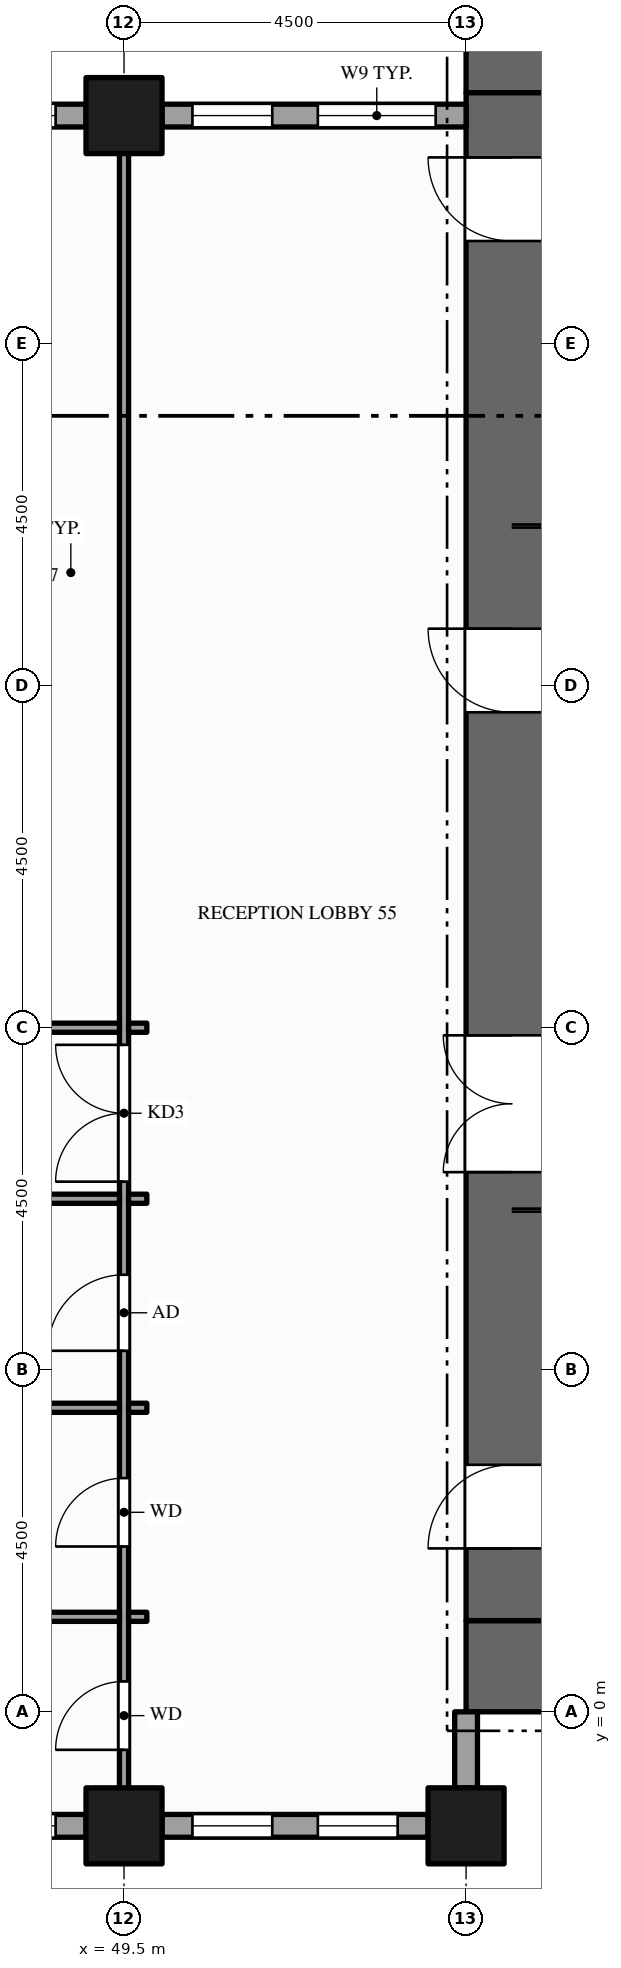
"""IFC4 building model, lengths in metres.
Left out: names, types, materials, properties, quantities, classifications, styles, units other than length and angle.
Written with IfcOpenShell. Run it as: python <this file> out.ifc"""

import sys

from ifc_helpers import new_model, si_unit, direction, frame, frame_2d, origin, origin_2d, place, context, subcontext, project, spatial, rectangle, hollow_rectangle, extrude, element, fill, save


model = new_model("IFC4")
c1 = context("Model", 3, precision=1e-05, world=origin(), true_north=direction((0.0, 1.0)))
c2 = subcontext(c1, "Body", "Model", "MODEL_VIEW")
j1 = project(units=[si_unit("LENGTHUNIT", "METRE"), si_unit("PLANEANGLEUNIT", "RADIAN")], contexts=[c1])
p1 = place(None, origin())
s1 = spatial("IfcSite", under=j1, at=p1, CompositionType="ELEMENT")
p2 = place(p1, origin())
s2 = spatial("IfcBuilding", under=s1, at=p2, CompositionType="ELEMENT")
p3 = place(p2, frame((0.0, 0.0, 103.0)))
s3 = spatial("IfcBuildingStorey", under=s2, at=p3, CompositionType="ELEMENT", Elevation=103.0)
for number, where, z_axis, x_axis in (
    (1, (67.5, 0.6, -0.15), (0.0, 0.0, 1.0), (-1.0, 0.0, 0.0)),
    (2, (54.0, 21.9, -0.15), (0.0, 0.0, 1.0), (1.0, 0.0, 0.0)),
):
    element("IfcWall", number, at=place(p3, frame(where, z_axis=z_axis, x_axis=x_axis)), inside=s3, PredefinedType="SHEAR", context=c2, shape_type="SweptSolid", body=[
        extrude(rectangle(XDim=13.5, YDim=1.2, at=frame_2d((6.75, 0.0))), origin(), (0.0, 0.0, 1.0), 4.0),
    ])
p4 = place(p3, frame((54.6, 1.2, -0.15), z_axis=(0.0, 0.0, 1.0), x_axis=(0.0, 1.0, 0.0)))
e3 = element("IfcWall", 3, at=p4, inside=s3, PredefinedType="SHEAR", context=c2, shape_type="SweptSolid", body=[
    extrude(rectangle(XDim=20.1, YDim=1.2, at=frame_2d((10.05, 0.0))), origin(), (0.0, 0.0, 1.0), 4.0),
])
p5 = place(p4, frame((5.9, 0.0, 0.15)))
e4 = element("IfcOpeningElement", 4, at=p5, cuts=e3, PredefinedType="OPENING", context=c2, shape_type="SweptSolid", body=[
    extrude(rectangle(XDim=1.8, YDim=2.1, at=frame_2d((0.9, 1.05))), frame((0.0, 0.61, 0.0), z_axis=(0.0, -1.0, 0.0), x_axis=(1.0, 0.0, 0.0)), (0.0, 0.0, 1.0), 1.22),
])
p6 = place(p4, frame((11.95, 0.0, 0.15)))
e5 = element("IfcOpeningElement", 5, at=p6, cuts=e3, PredefinedType="OPENING", context=c2, shape_type="SweptSolid", body=[
    extrude(rectangle(XDim=1.1, YDim=2.1, at=frame_2d((0.55, 1.05))), frame((0.0, 0.61, 0.0), z_axis=(0.0, -1.0, 0.0), x_axis=(1.0, 0.0, 0.0)), (0.0, 0.0, 1.0), 1.22),
])
p7 = place(p4, frame((0.95, 0.0, 0.15)))
e6 = element("IfcOpeningElement", 6, at=p7, cuts=e3, PredefinedType="OPENING", context=c2, shape_type="SweptSolid", body=[
    extrude(rectangle(XDim=1.1, YDim=2.1, at=frame_2d((0.55, 1.05))), frame((0.0, 0.61, 0.0), z_axis=(0.0, -1.0, 0.0), x_axis=(1.0, 0.0, 0.0)), (0.0, 0.0, 1.0), 1.22),
])
p8 = place(p4, frame((18.15, 0.0, 0.15)))
e7 = element("IfcOpeningElement", 7, at=p8, cuts=e3, PredefinedType="OPENING", context=c2, shape_type="SweptSolid", body=[
    extrude(rectangle(XDim=1.1, YDim=2.1, at=frame_2d((0.55, 1.05))), frame((0.0, 0.61, 0.0), z_axis=(0.0, -1.0, 0.0), x_axis=(1.0, 0.0, 0.0)), (0.0, 0.0, 1.0), 1.22),
])
for number, where, z_axis, x_axis in (
    (8, (49.5, -1.5, -0.15), (0.0, 0.0, 1.0), (1.0, 0.0, 0.0)),
    (9, (49.5, 21.0, -0.15), (0.0, 0.0, 1.0), (1.0, 0.0, 0.0)),
    (10, (54.0, -1.5, -0.15), (0.0, 0.0, 1.0), (1.0, 0.0, 0.0)),
):
    element("IfcColumn", number, at=place(p3, frame(where, z_axis=z_axis, x_axis=x_axis)), inside=s3, PredefinedType="COLUMN", context=c2, shape_type="SweptSolid", body=[
        extrude(hollow_rectangle(XDim=1.0, YDim=1.0, WallThickness=0.05, at=origin_2d()), origin(), (0.0, 0.0, 1.0), 4.0),
    ])
p9 = place(p3, frame((45.5, -1.5, 0.0), z_axis=(0.0, 0.0, 1.0), x_axis=(1.0, 0.0, 0.0)))
e11 = element("IfcWall", 11, at=p9, inside=s3, PredefinedType="STANDARD", context=c2, shape_type="SweptSolid", body=[
    extrude(rectangle(XDim=3.5, YDim=0.3, at=frame_2d((1.75, 0.0))), origin(), (0.0, 0.0, 1.0), 3.154),
])
p10 = place(p9, frame((0.4, 0.0, 0.9)))
e12 = element("IfcOpeningElement", 12, at=p10, cuts=e11, PredefinedType="OPENING", context=c2, shape_type="SweptSolid", body=[
    extrude(rectangle(XDim=1.05, YDim=2.0, at=frame_2d((0.525, 1.0))), frame((0.0, 0.16, 0.0), z_axis=(0.0, -1.0, 0.0), x_axis=(1.0, 0.0, 0.0)), (0.0, 0.0, 1.0), 0.32),
])
p11 = place(p9, frame((2.05, 0.0, 0.9)))
e13 = element("IfcOpeningElement", 13, at=p11, cuts=e11, PredefinedType="OPENING", context=c2, shape_type="SweptSolid", body=[
    extrude(rectangle(XDim=1.05, YDim=2.0, at=frame_2d((0.525, 1.0))), frame((0.0, 0.16, 0.0), z_axis=(0.0, -1.0, 0.0), x_axis=(1.0, 0.0, 0.0)), (0.0, 0.0, 1.0), 0.32),
])
p12 = place(p3, frame((50.0, -1.5, 0.0), z_axis=(0.0, 0.0, 1.0), x_axis=(1.0, 0.0, 0.0)))
e14 = element("IfcWall", 14, at=p12, inside=s3, PredefinedType="STANDARD", context=c2, shape_type="SweptSolid", body=[
    extrude(rectangle(XDim=3.5, YDim=0.3, at=frame_2d((1.75, 0.0))), origin(), (0.0, 0.0, 1.0), 3.154),
])
p13 = place(p12, frame((0.4, 0.0, 0.9)))
e15 = element("IfcOpeningElement", 15, at=p13, cuts=e14, PredefinedType="OPENING", context=c2, shape_type="SweptSolid", body=[
    extrude(rectangle(XDim=1.05, YDim=2.0, at=frame_2d((0.525, 1.0))), frame((0.0, 0.16, 0.0), z_axis=(0.0, -1.0, 0.0), x_axis=(1.0, 0.0, 0.0)), (0.0, 0.0, 1.0), 0.32),
])
p14 = place(p12, frame((2.05, 0.0, 0.9)))
e16 = element("IfcOpeningElement", 16, at=p14, cuts=e14, PredefinedType="OPENING", context=c2, shape_type="SweptSolid", body=[
    extrude(rectangle(XDim=1.05, YDim=2.0, at=frame_2d((0.525, 1.0))), frame((0.0, 0.16, 0.0), z_axis=(0.0, -1.0, 0.0), x_axis=(1.0, 0.0, 0.0)), (0.0, 0.0, 1.0), 0.32),
])
p15 = place(p3, frame((54.0, -1.0, 0.0), z_axis=(0.0, 0.0, 1.0), x_axis=(0.0, 1.0, 0.0)))
e17 = element("IfcWall", 17, at=p15, inside=s3, PredefinedType="STANDARD", context=c2, shape_type="SweptSolid", body=[
    extrude(rectangle(XDim=1.0, YDim=0.3, at=frame_2d((0.5, 0.0))), origin(), (0.0, 0.0, 1.0), 3.154),
])
p16 = place(p3, frame((54.0, 21.0, 0.0), z_axis=(0.0, 0.0, 1.0), x_axis=(-1.0, 0.0, 0.0)))
e18 = element("IfcWall", 18, at=p16, inside=s3, PredefinedType="STANDARD", context=c2, shape_type="SweptSolid", body=[
    extrude(rectangle(XDim=4.0, YDim=0.3, at=frame_2d((2.0, 0.0))), origin(), (0.0, 0.0, 1.0), 3.154),
])
p17 = place(p16, frame((0.4, 0.0, 0.9)))
e19 = element("IfcOpeningElement", 19, at=p17, cuts=e18, PredefinedType="OPENING", context=c2, shape_type="SweptSolid", body=[
    extrude(rectangle(XDim=1.55, YDim=2.0, at=frame_2d((0.775, 1.0))), frame((0.0, 0.16, 0.0), z_axis=(0.0, -1.0, 0.0), x_axis=(1.0, 0.0, 0.0)), (0.0, 0.0, 1.0), 0.32),
])
p18 = place(p16, frame((2.55, 0.0, 0.9)))
e20 = element("IfcOpeningElement", 20, at=p18, cuts=e18, PredefinedType="OPENING", context=c2, shape_type="SweptSolid", body=[
    extrude(rectangle(XDim=1.05, YDim=2.0, at=frame_2d((0.525, 1.0))), frame((0.0, 0.16, 0.0), z_axis=(0.0, -1.0, 0.0), x_axis=(1.0, 0.0, 0.0)), (0.0, 0.0, 1.0), 0.32),
])
p19 = place(p3, frame((49.0, 21.0, 0.0), z_axis=(0.0, 0.0, 1.0), x_axis=(-1.0, 0.0, 0.0)))
e21 = element("IfcWall", 21, at=p19, inside=s3, PredefinedType="STANDARD", context=c2, shape_type="SweptSolid", body=[
    extrude(rectangle(XDim=3.5, YDim=0.3, at=frame_2d((1.75, 0.0))), origin(), (0.0, 0.0, 1.0), 3.154),
])
p20 = place(p19, frame((0.4, 0.0, 0.9)))
e22 = element("IfcOpeningElement", 22, at=p20, cuts=e21, PredefinedType="OPENING", context=c2, shape_type="SweptSolid", body=[
    extrude(rectangle(XDim=1.05, YDim=2.0, at=frame_2d((0.525, 1.0))), frame((0.0, 0.16, 0.0), z_axis=(0.0, -1.0, 0.0), x_axis=(1.0, 0.0, 0.0)), (0.0, 0.0, 1.0), 0.32),
])
p21 = place(p19, frame((2.05, 0.0, 0.9)))
e23 = element("IfcOpeningElement", 23, at=p21, cuts=e21, PredefinedType="OPENING", context=c2, shape_type="SweptSolid", body=[
    extrude(rectangle(XDim=1.05, YDim=2.0, at=frame_2d((0.525, 1.0))), frame((0.0, 0.16, 0.0), z_axis=(0.0, -1.0, 0.0), x_axis=(1.0, 0.0, 0.0)), (0.0, 0.0, 1.0), 0.32),
])
p22 = place(p3, frame((49.5, -1.35, 0.0), z_axis=(0.0, 0.0, 1.0), x_axis=(0.0, 1.0, 0.0)))
e24 = element("IfcWall", 24, at=p22, inside=s3, PredefinedType="PARTITIONING", context=c2, shape_type="SweptSolid", body=[
    extrude(rectangle(XDim=22.2, YDim=0.12, at=frame_2d((11.1, 0.0))), origin(), (0.0, 0.0, 1.0), 2.938),
])
p23 = place(p22, frame((8.325, 0.0, 0.0)))
e25 = element("IfcOpeningElement", 25, at=p23, cuts=e24, PredefinedType="OPENING", context=c2, shape_type="SweptSolid", body=[
    extrude(rectangle(XDim=1.8, YDim=2.1, at=frame_2d((0.9, 1.05))), frame((0.0, 0.07, 0.0), z_axis=(0.0, -1.0, 0.0), x_axis=(1.0, 0.0, 0.0)), (0.0, 0.0, 1.0), 0.14),
])
p24 = place(p22, frame((0.85, 0.0, 0.0)))
e26 = element("IfcOpeningElement", 26, at=p24, cuts=e24, PredefinedType="OPENING", context=c2, shape_type="SweptSolid", body=[
    extrude(rectangle(XDim=0.9, YDim=2.1, at=frame_2d((0.45, 1.05))), frame((0.0, 0.07, 0.0), z_axis=(0.0, -1.0, 0.0), x_axis=(1.0, 0.0, 0.0)), (0.0, 0.0, 1.0), 0.14),
])
p25 = place(p22, frame((3.525, 0.0, 0.0)))
e27 = element("IfcOpeningElement", 27, at=p25, cuts=e24, PredefinedType="OPENING", context=c2, shape_type="SweptSolid", body=[
    extrude(rectangle(XDim=0.9, YDim=2.1, at=frame_2d((0.45, 1.05))), frame((0.0, 0.07, 0.0), z_axis=(0.0, -1.0, 0.0), x_axis=(1.0, 0.0, 0.0)), (0.0, 0.0, 1.0), 0.14),
])
p26 = place(p22, frame((6.1, 0.0, 0.0)))
e28 = element("IfcOpeningElement", 28, at=p26, cuts=e24, PredefinedType="OPENING", context=c2, shape_type="SweptSolid", body=[
    extrude(rectangle(XDim=1.0, YDim=2.1, at=frame_2d((0.5, 1.05))), frame((0.0, 0.07, 0.0), z_axis=(0.0, -1.0, 0.0), x_axis=(1.0, 0.0, 0.0)), (0.0, 0.0, 1.0), 0.14),
])
p27 = place(p3, frame((45.06, 1.25, 0.0), z_axis=(0.0, 0.0, 1.0), x_axis=(1.0, 0.0, 0.0)))
e29 = element("IfcWall", 29, at=p27, inside=s3, PredefinedType="PARTITIONING", context=c2, shape_type="SweptSolid", body=[
    extrude(rectangle(XDim=4.38, YDim=0.12, at=frame_2d((2.19, 0.0))), origin(), (0.0, 0.0, 1.0), 2.938),
])
p28 = place(p3, frame((49.56, 1.25, 0.0), z_axis=(0.0, 0.0, 1.0), x_axis=(1.0, 0.0, 0.0)))
e30 = element("IfcWall", 30, at=p28, inside=s3, PredefinedType="PARTITIONING", context=c2, shape_type="SweptSolid", body=[
    extrude(rectangle(XDim=0.24, YDim=0.12, at=frame_2d((0.12, 0.0))), origin(), (0.0, 0.0, 1.0), 2.938),
])
p29 = place(p3, frame((45.06, 4.0, 0.0), z_axis=(0.0, 0.0, 1.0), x_axis=(1.0, 0.0, 0.0)))
e31 = element("IfcWall", 31, at=p29, inside=s3, PredefinedType="PARTITIONING", context=c2, shape_type="SweptSolid", body=[
    extrude(rectangle(XDim=4.38, YDim=0.12, at=frame_2d((2.19, 0.0))), origin(), (0.0, 0.0, 1.0), 2.938),
])
p30 = place(p3, frame((49.56, 4.0, 0.0), z_axis=(0.0, 0.0, 1.0), x_axis=(1.0, 0.0, 0.0)))
e32 = element("IfcWall", 32, at=p30, inside=s3, PredefinedType="PARTITIONING", context=c2, shape_type="SweptSolid", body=[
    extrude(rectangle(XDim=0.24, YDim=0.12, at=frame_2d((0.12, 0.0))), origin(), (0.0, 0.0, 1.0), 2.938),
])
p31 = place(p3, frame((45.06, 6.75, 0.0), z_axis=(0.0, 0.0, 1.0), x_axis=(1.0, 0.0, 0.0)))
e33 = element("IfcWall", 33, at=p31, inside=s3, PredefinedType="PARTITIONING", context=c2, shape_type="SweptSolid", body=[
    extrude(rectangle(XDim=4.38, YDim=0.12, at=frame_2d((2.19, 0.0))), origin(), (0.0, 0.0, 1.0), 2.938),
])
p32 = place(p3, frame((49.56, 6.75, 0.0), z_axis=(0.0, 0.0, 1.0), x_axis=(1.0, 0.0, 0.0)))
e34 = element("IfcWall", 34, at=p32, inside=s3, PredefinedType="PARTITIONING", context=c2, shape_type="SweptSolid", body=[
    extrude(rectangle(XDim=0.24, YDim=0.12, at=frame_2d((0.12, 0.0))), origin(), (0.0, 0.0, 1.0), 2.938),
])
p33 = place(p3, frame((45.06, 9.0, 0.0), z_axis=(0.0, 0.0, 1.0), x_axis=(1.0, 0.0, 0.0)))
e35 = element("IfcWall", 35, at=p33, inside=s3, PredefinedType="PARTITIONING", context=c2, shape_type="SweptSolid", body=[
    extrude(rectangle(XDim=4.38, YDim=0.12, at=frame_2d((2.19, 0.0))), origin(), (0.0, 0.0, 1.0), 2.938),
])
p34 = place(p33, frame((1.59, 0.0, 0.0)))
e36 = element("IfcOpeningElement", 36, at=p34, cuts=e35, PredefinedType="OPENING", context=c2, shape_type="SweptSolid", body=[
    extrude(rectangle(XDim=1.2, YDim=2.1, at=frame_2d((0.6, 1.05))), frame((0.0, 0.07, 0.0), z_axis=(0.0, -1.0, 0.0), x_axis=(1.0, 0.0, 0.0)), (0.0, 0.0, 1.0), 0.14),
])
p35 = place(p3, frame((49.56, 9.0, 0.0), z_axis=(0.0, 0.0, 1.0), x_axis=(1.0, 0.0, 0.0)))
e37 = element("IfcWall", 37, at=p35, inside=s3, PredefinedType="PARTITIONING", context=c2, shape_type="SweptSolid", body=[
    extrude(rectangle(XDim=0.24, YDim=0.12, at=frame_2d((0.12, 0.0))), origin(), (0.0, 0.0, 1.0), 2.938),
])
p36 = place(p11, origin())
e38 = element("IfcWindow", 38, at=p36, inside=s3, PartitioningType="SINGLE_PANEL", PredefinedType="WINDOW", context=c2, shape_type="SweptSolid", body=[
    extrude(rectangle(XDim=1.05, YDim=2.0, at=frame_2d((0.525, 1.0))), frame((0.0, 0.03, 0.0), z_axis=(0.0, -1.0, 0.0), x_axis=(1.0, 0.0, 0.0)), (0.0, 0.0, 1.0), 0.06),
])
fill(e13, e38)
p37 = place(p13, origin())
e39 = element("IfcWindow", 39, at=p37, inside=s3, PartitioningType="SINGLE_PANEL", PredefinedType="WINDOW", context=c2, shape_type="SweptSolid", body=[
    extrude(rectangle(XDim=1.05, YDim=2.0, at=frame_2d((0.525, 1.0))), frame((0.0, 0.03, 0.0), z_axis=(0.0, -1.0, 0.0), x_axis=(1.0, 0.0, 0.0)), (0.0, 0.0, 1.0), 0.06),
])
fill(e15, e39)
p38 = place(p14, origin())
e40 = element("IfcWindow", 40, at=p38, inside=s3, PartitioningType="SINGLE_PANEL", PredefinedType="WINDOW", context=c2, shape_type="SweptSolid", body=[
    extrude(rectangle(XDim=1.05, YDim=2.0, at=frame_2d((0.525, 1.0))), frame((0.0, 0.03, 0.0), z_axis=(0.0, -1.0, 0.0), x_axis=(1.0, 0.0, 0.0)), (0.0, 0.0, 1.0), 0.06),
])
fill(e16, e40)
p39 = place(p17, origin())
e41 = element("IfcWindow", 41, at=p39, inside=s3, PartitioningType="SINGLE_PANEL", PredefinedType="WINDOW", context=c2, shape_type="SweptSolid", body=[
    extrude(rectangle(XDim=1.55, YDim=2.0, at=frame_2d((0.775, 1.0))), frame((0.0, 0.03, 0.0), z_axis=(0.0, -1.0, 0.0), x_axis=(1.0, 0.0, 0.0)), (0.0, 0.0, 1.0), 0.06),
])
fill(e19, e41)
p40 = place(p18, origin())
e42 = element("IfcWindow", 42, at=p40, inside=s3, PartitioningType="SINGLE_PANEL", PredefinedType="WINDOW", context=c2, shape_type="SweptSolid", body=[
    extrude(rectangle(XDim=1.05, YDim=2.0, at=frame_2d((0.525, 1.0))), frame((0.0, 0.03, 0.0), z_axis=(0.0, -1.0, 0.0), x_axis=(1.0, 0.0, 0.0)), (0.0, 0.0, 1.0), 0.06),
])
fill(e20, e42)
p41 = place(p20, origin())
e43 = element("IfcWindow", 43, at=p41, inside=s3, PartitioningType="SINGLE_PANEL", PredefinedType="WINDOW", context=c2, shape_type="SweptSolid", body=[
    extrude(rectangle(XDim=1.05, YDim=2.0, at=frame_2d((0.525, 1.0))), frame((0.0, 0.03, 0.0), z_axis=(0.0, -1.0, 0.0), x_axis=(1.0, 0.0, 0.0)), (0.0, 0.0, 1.0), 0.06),
])
fill(e22, e43)
p42 = place(p5, origin())
e44 = element("IfcDoor", 44, at=p42, inside=s3, OperationType="DOUBLE_DOOR_SINGLE_SWING", PredefinedType="DOOR", context=c2, shape_type="SweptSolid", body=[
    extrude(rectangle(XDim=1.8, YDim=2.1, at=frame_2d((0.9, 1.05))), frame((0.0, 0.025, 0.0), z_axis=(0.0, -1.0, 0.0), x_axis=(1.0, 0.0, 0.0)), (0.0, 0.0, 1.0), 0.05),
])
fill(e4, e44)
p43 = place(p6, origin())
e45 = element("IfcDoor", 45, at=p43, inside=s3, OperationType="SINGLE_SWING_RIGHT", PredefinedType="DOOR", context=c2, shape_type="SweptSolid", body=[
    extrude(rectangle(XDim=1.1, YDim=2.1, at=frame_2d((0.55, 1.05))), frame((0.0, 0.025, 0.0), z_axis=(0.0, -1.0, 0.0), x_axis=(1.0, 0.0, 0.0)), (0.0, 0.0, 1.0), 0.05),
])
fill(e5, e45)
p44 = place(p7, origin())
e46 = element("IfcDoor", 46, at=p44, inside=s3, OperationType="SINGLE_SWING_LEFT", PredefinedType="DOOR", context=c2, shape_type="SweptSolid", body=[
    extrude(rectangle(XDim=1.1, YDim=2.1, at=frame_2d((0.55, 1.05))), frame((0.0, 0.025, 0.0), z_axis=(0.0, -1.0, 0.0), x_axis=(1.0, 0.0, 0.0)), (0.0, 0.0, 1.0), 0.05),
])
fill(e6, e46)
p45 = place(p8, origin())
e47 = element("IfcDoor", 47, at=p45, inside=s3, OperationType="SINGLE_SWING_RIGHT", PredefinedType="DOOR", context=c2, shape_type="SweptSolid", body=[
    extrude(rectangle(XDim=1.1, YDim=2.1, at=frame_2d((0.55, 1.05))), frame((0.0, 0.025, 0.0), z_axis=(0.0, -1.0, 0.0), x_axis=(1.0, 0.0, 0.0)), (0.0, 0.0, 1.0), 0.05),
])
fill(e7, e47)
p46 = place(p23, origin())
e48 = element("IfcDoor", 48, at=p46, inside=s3, OperationType="DOUBLE_DOOR_SINGLE_SWING", PredefinedType="DOOR", context=c2, shape_type="SweptSolid", body=[
    extrude(rectangle(XDim=1.8, YDim=2.1, at=frame_2d((0.9, 1.05))), frame((0.0, 0.025, 0.0), z_axis=(0.0, -1.0, 0.0), x_axis=(1.0, 0.0, 0.0)), (0.0, 0.0, 1.0), 0.05),
])
fill(e25, e48)
p47 = place(p24, origin())
e49 = element("IfcDoor", 49, at=p47, inside=s3, OperationType="SINGLE_SWING_LEFT", PredefinedType="DOOR", context=c2, shape_type="SweptSolid", body=[
    extrude(rectangle(XDim=0.9, YDim=2.1, at=frame_2d((0.45, 1.05))), frame((0.0, 0.025, 0.0), z_axis=(0.0, -1.0, 0.0), x_axis=(1.0, 0.0, 0.0)), (0.0, 0.0, 1.0), 0.05),
])
fill(e26, e49)
p48 = place(p25, origin())
e50 = element("IfcDoor", 50, at=p48, inside=s3, OperationType="SINGLE_SWING_LEFT", PredefinedType="DOOR", context=c2, shape_type="SweptSolid", body=[
    extrude(rectangle(XDim=0.9, YDim=2.1, at=frame_2d((0.45, 1.05))), frame((0.0, 0.025, 0.0), z_axis=(0.0, -1.0, 0.0), x_axis=(1.0, 0.0, 0.0)), (0.0, 0.0, 1.0), 0.05),
])
fill(e27, e50)
p49 = place(p26, origin())
e51 = element("IfcDoor", 51, at=p49, inside=s3, OperationType="SINGLE_SWING_LEFT", PredefinedType="DOOR", context=c2, shape_type="SweptSolid", body=[
    extrude(rectangle(XDim=1.0, YDim=2.1, at=frame_2d((0.5, 1.05))), frame((0.0, 0.025, 0.0), z_axis=(0.0, -1.0, 0.0), x_axis=(1.0, 0.0, 0.0)), (0.0, 0.0, 1.0), 0.05),
])
fill(e28, e51)
save(model, sys.argv[1])
